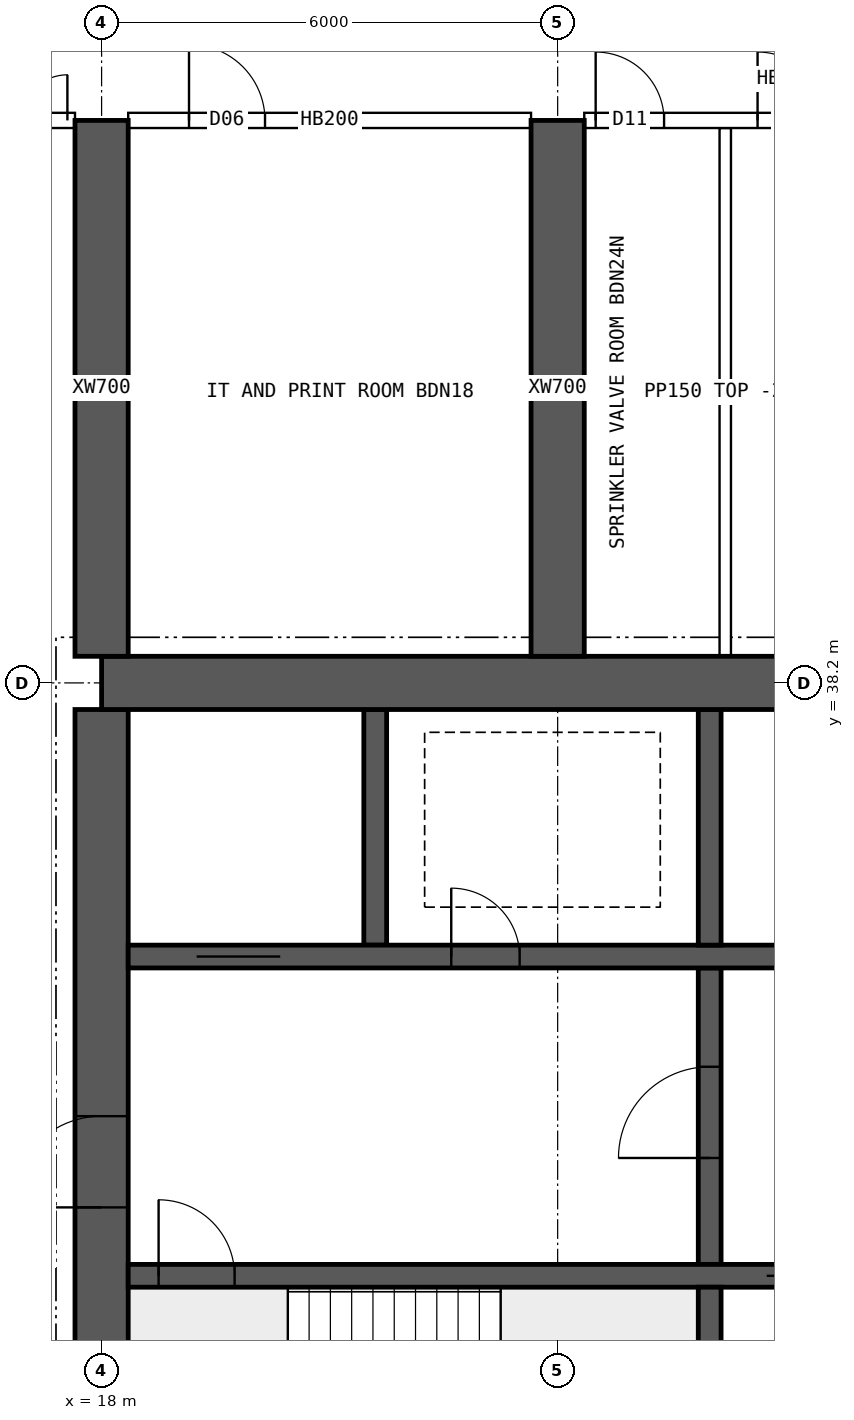
"""IFC4 building model, lengths in metres.
Left out: names, types, materials, properties, quantities, classifications, styles, units other than length and angle.
Written with IfcOpenShell. Run it as: python <this file> out.ifc"""

import sys

from ifc_helpers import new_model, si_unit, direction, frame, frame_2d, origin, place, context, subcontext, project, spatial, rectangle, extrude, element, fill, save


model = new_model("IFC4")
c1 = context("Model", 3, precision=1e-05, world=origin(), true_north=direction((0.0, 1.0)))
c2 = subcontext(c1, "Body", "Model", "MODEL_VIEW")
j1 = project(units=[si_unit("LENGTHUNIT", "METRE"), si_unit("PLANEANGLEUNIT", "RADIAN")], contexts=[c1])
p1 = place(None, origin())
s1 = spatial("IfcSite", under=j1, at=p1, CompositionType="ELEMENT")
p2 = place(p1, origin())
s2 = spatial("IfcBuilding", under=s1, at=p2, CompositionType="ELEMENT")
p3 = place(p2, frame((0.0, 0.0, 220.3)))
s3 = spatial("IfcBuildingStorey", under=s2, at=p3, CompositionType="ELEMENT", Elevation=220.3)
p4 = place(p3, frame((18.0, 38.2, 0.0), z_axis=(0.0, 0.0, 1.0), x_axis=(1.0, 0.0, 0.0)))
e1 = element("IfcWall", 1, at=p4, inside=s3, PredefinedType="SHEAR", context=c2, shape_type="SweptSolid", body=[
    extrude(rectangle(XDim=48.0, YDim=0.7, at=frame_2d((24.0, 0.0))), origin(), (0.0, 0.0, 1.0), 3.75),
])
p5 = place(p3, frame((18.0, 26.15, 0.0), z_axis=(0.0, 0.0, 1.0), x_axis=(0.0, 1.0, 0.0)))
e2 = element("IfcWall", 2, at=p5, inside=s3, PredefinedType="SHEAR", context=c2, shape_type="SweptSolid", body=[
    extrude(rectangle(XDim=11.7, YDim=0.7, at=frame_2d((5.85, 0.0))), origin(), (0.0, 0.0, 1.0), 3.75),
])
p6 = place(p5, frame((5.15, 0.0, 0.0)))
e3 = element("IfcOpeningElement", 3, at=p6, cuts=e2, PredefinedType="OPENING", context=c2, shape_type="SweptSolid", body=[
    extrude(rectangle(XDim=1.2, YDim=2.1, at=frame_2d((0.6, 1.05))), frame((0.0, 0.36, 0.0), z_axis=(0.0, -1.0, 0.0), x_axis=(1.0, 0.0, 0.0)), (0.0, 0.0, 1.0), 0.72),
])
p7 = place(p3, frame((18.35, 30.4, 0.0), z_axis=(0.0, 0.0, 1.0), x_axis=(1.0, 0.0, 0.0)))
e4 = element("IfcWall", 4, at=p7, inside=s3, PredefinedType="SHEAR", context=c2, shape_type="SweptSolid", body=[
    extrude(rectangle(XDim=47.3, YDim=0.3, at=frame_2d((23.65, 0.0))), origin(), (0.0, 0.0, 1.0), 3.75),
])
p8 = place(p7, frame((0.4, 0.0, 0.0)))
e5 = element("IfcOpeningElement", 5, at=p8, cuts=e4, PredefinedType="OPENING", context=c2, shape_type="SweptSolid", body=[
    extrude(rectangle(XDim=1.0, YDim=2.1, at=frame_2d((0.5, 1.05))), frame((0.0, 0.16, 0.0), z_axis=(0.0, -1.0, 0.0), x_axis=(1.0, 0.0, 0.0)), (0.0, 0.0, 1.0), 0.32),
])
p9 = place(p7, frame((45.9, 0.0, 0.0)))
e6 = element("IfcOpeningElement", 6, at=p9, cuts=e4, PredefinedType="OPENING", context=c2, shape_type="SweptSolid", body=[
    extrude(rectangle(XDim=1.0, YDim=2.1, at=frame_2d((0.5, 1.05))), frame((0.0, 0.16, 0.0), z_axis=(0.0, -1.0, 0.0), x_axis=(1.0, 0.0, 0.0)), (0.0, 0.0, 1.0), 0.32),
])
p10 = place(p7, frame((8.4, 0.0, 0.0)))
e7 = element("IfcOpeningElement", 7, at=p10, cuts=e4, PredefinedType="OPENING", context=c2, shape_type="SweptSolid", body=[
    extrude(rectangle(XDim=1.1, YDim=2.1, at=frame_2d((0.55, 1.05))), frame((0.0, 0.16, 0.0), z_axis=(0.0, -1.0, 0.0), x_axis=(1.0, 0.0, 0.0)), (0.0, 0.0, 1.0), 0.32),
])
p11 = place(p7, frame((11.0, 0.0, 0.0)))
e8 = element("IfcOpeningElement", 8, at=p11, cuts=e4, PredefinedType="OPENING", context=c2, shape_type="SweptSolid", body=[
    extrude(rectangle(XDim=1.1, YDim=2.1, at=frame_2d((0.55, 1.05))), frame((0.0, 0.16, 0.0), z_axis=(0.0, -1.0, 0.0), x_axis=(1.0, 0.0, 0.0)), (0.0, 0.0, 1.0), 0.32),
])
p12 = place(p7, frame((13.6, 0.0, 0.0)))
e9 = element("IfcOpeningElement", 9, at=p12, cuts=e4, PredefinedType="OPENING", context=c2, shape_type="SweptSolid", body=[
    extrude(rectangle(XDim=1.1, YDim=2.1, at=frame_2d((0.55, 1.05))), frame((0.0, 0.16, 0.0), z_axis=(0.0, -1.0, 0.0), x_axis=(1.0, 0.0, 0.0)), (0.0, 0.0, 1.0), 0.32),
])
p13 = place(p7, frame((16.2, 0.0, 0.0)))
e10 = element("IfcOpeningElement", 10, at=p13, cuts=e4, PredefinedType="OPENING", context=c2, shape_type="SweptSolid", body=[
    extrude(rectangle(XDim=1.1, YDim=2.1, at=frame_2d((0.55, 1.05))), frame((0.0, 0.16, 0.0), z_axis=(0.0, -1.0, 0.0), x_axis=(1.0, 0.0, 0.0)), (0.0, 0.0, 1.0), 0.32),
])
p14 = place(p7, frame((18.975, 0.0, 0.0)))
e11 = element("IfcOpeningElement", 11, at=p14, cuts=e4, PredefinedType="OPENING", context=c2, shape_type="SweptSolid", body=[
    extrude(rectangle(XDim=0.9, YDim=2.1, at=frame_2d((0.45, 1.05))), frame((0.0, 0.16, 0.0), z_axis=(0.0, -1.0, 0.0), x_axis=(1.0, 0.0, 0.0)), (0.0, 0.0, 1.0), 0.32),
])
p15 = place(p7, frame((24.475, 0.0, 0.0)))
e12 = element("IfcOpeningElement", 12, at=p15, cuts=e4, PredefinedType="OPENING", context=c2, shape_type="SweptSolid", body=[
    extrude(rectangle(XDim=0.9, YDim=2.1, at=frame_2d((0.45, 1.05))), frame((0.0, 0.16, 0.0), z_axis=(0.0, -1.0, 0.0), x_axis=(1.0, 0.0, 0.0)), (0.0, 0.0, 1.0), 0.32),
])
p16 = place(p7, frame((30.267, 0.0, 0.0)))
e13 = element("IfcOpeningElement", 13, at=p16, cuts=e4, PredefinedType="OPENING", context=c2, shape_type="SweptSolid", body=[
    extrude(rectangle(XDim=1.1, YDim=2.1, at=frame_2d((0.55, 1.05))), frame((0.0, 0.16, 0.0), z_axis=(0.0, -1.0, 0.0), x_axis=(1.0, 0.0, 0.0)), (0.0, 0.0, 1.0), 0.32),
])
p17 = place(p7, frame((33.8, 0.0, 0.0)))
e14 = element("IfcOpeningElement", 14, at=p17, cuts=e4, PredefinedType="OPENING", context=c2, shape_type="SweptSolid", body=[
    extrude(rectangle(XDim=1.1, YDim=2.1, at=frame_2d((0.55, 1.05))), frame((0.0, 0.16, 0.0), z_axis=(0.0, -1.0, 0.0), x_axis=(1.0, 0.0, 0.0)), (0.0, 0.0, 1.0), 0.32),
])
p18 = place(p7, frame((37.333, 0.0, 0.0)))
e15 = element("IfcOpeningElement", 15, at=p18, cuts=e4, PredefinedType="OPENING", context=c2, shape_type="SweptSolid", body=[
    extrude(rectangle(XDim=1.1, YDim=2.1, at=frame_2d((0.55, 1.05))), frame((0.0, 0.16, 0.0), z_axis=(0.0, -1.0, 0.0), x_axis=(1.0, 0.0, 0.0)), (0.0, 0.0, 1.0), 0.32),
])
p19 = place(p3, frame((18.35, 34.6, 0.0), z_axis=(0.0, 0.0, 1.0), x_axis=(1.0, 0.0, 0.0)))
e16 = element("IfcWall", 16, at=p19, inside=s3, PredefinedType="SHEAR", context=c2, shape_type="SweptSolid", body=[
    extrude(rectangle(XDim=47.3, YDim=0.3, at=frame_2d((23.65, 0.0))), origin(), (0.0, 0.0, 1.0), 3.75),
])
p20 = place(p19, frame((0.9, 0.0, 0.0)))
e17 = element("IfcOpeningElement", 17, at=p20, cuts=e16, PredefinedType="OPENING", context=c2, shape_type="SweptSolid", body=[
    extrude(rectangle(XDim=1.1, YDim=2.1, at=frame_2d((0.55, 1.05))), frame((0.0, 0.16, 0.0), z_axis=(0.0, -1.0, 0.0), x_axis=(1.0, 0.0, 0.0)), (0.0, 0.0, 1.0), 0.32),
])
p21 = place(p19, frame((45.3, 0.0, 0.0)))
e18 = element("IfcOpeningElement", 18, at=p21, cuts=e16, PredefinedType="OPENING", context=c2, shape_type="SweptSolid", body=[
    extrude(rectangle(XDim=1.1, YDim=2.1, at=frame_2d((0.55, 1.05))), frame((0.0, 0.16, 0.0), z_axis=(0.0, -1.0, 0.0), x_axis=(1.0, 0.0, 0.0)), (0.0, 0.0, 1.0), 0.32),
])
p22 = place(p19, frame((4.25, 0.0, 0.0)))
e19 = element("IfcOpeningElement", 19, at=p22, cuts=e16, PredefinedType="OPENING", context=c2, shape_type="SweptSolid", body=[
    extrude(rectangle(XDim=0.9, YDim=2.1, at=frame_2d((0.45, 1.05))), frame((0.0, 0.16, 0.0), z_axis=(0.0, -1.0, 0.0), x_axis=(1.0, 0.0, 0.0)), (0.0, 0.0, 1.0), 0.32),
])
p23 = place(p19, frame((42.15, 0.0, 0.0)))
e20 = element("IfcOpeningElement", 20, at=p23, cuts=e16, PredefinedType="OPENING", context=c2, shape_type="SweptSolid", body=[
    extrude(rectangle(XDim=0.9, YDim=2.1, at=frame_2d((0.45, 1.05))), frame((0.0, 0.16, 0.0), z_axis=(0.0, -1.0, 0.0), x_axis=(1.0, 0.0, 0.0)), (0.0, 0.0, 1.0), 0.32),
])
p24 = place(p19, frame((9.025, 0.0, 0.0)))
e21 = element("IfcOpeningElement", 21, at=p24, cuts=e16, PredefinedType="OPENING", context=c2, shape_type="SweptSolid", body=[
    extrude(rectangle(XDim=0.9, YDim=2.1, at=frame_2d((0.45, 1.05))), frame((0.0, 0.16, 0.0), z_axis=(0.0, -1.0, 0.0), x_axis=(1.0, 0.0, 0.0)), (0.0, 0.0, 1.0), 0.32),
])
p25 = place(p19, frame((12.999, 0.0, 0.0)))
e22 = element("IfcOpeningElement", 22, at=p25, cuts=e16, PredefinedType="OPENING", context=c2, shape_type="SweptSolid", body=[
    extrude(rectangle(XDim=0.9, YDim=2.1, at=frame_2d((0.45, 1.05))), frame((0.0, 0.16, 0.0), z_axis=(0.0, -1.0, 0.0), x_axis=(1.0, 0.0, 0.0)), (0.0, 0.0, 1.0), 0.32),
])
p26 = place(p19, frame((16.646, 0.0, 0.0)))
e23 = element("IfcOpeningElement", 23, at=p26, cuts=e16, PredefinedType="OPENING", context=c2, shape_type="SweptSolid", body=[
    extrude(rectangle(XDim=0.9, YDim=2.1, at=frame_2d((0.45, 1.05))), frame((0.0, 0.16, 0.0), z_axis=(0.0, -1.0, 0.0), x_axis=(1.0, 0.0, 0.0)), (0.0, 0.0, 1.0), 0.32),
])
p27 = place(p19, frame((20.405, 0.0, 0.0)))
e24 = element("IfcOpeningElement", 24, at=p27, cuts=e16, PredefinedType="OPENING", context=c2, shape_type="SweptSolid", body=[
    extrude(rectangle(XDim=0.9, YDim=2.1, at=frame_2d((0.45, 1.05))), frame((0.0, 0.16, 0.0), z_axis=(0.0, -1.0, 0.0), x_axis=(1.0, 0.0, 0.0)), (0.0, 0.0, 1.0), 0.32),
])
p28 = place(p19, frame((24.811, 0.0, 0.0)))
e25 = element("IfcOpeningElement", 25, at=p28, cuts=e16, PredefinedType="OPENING", context=c2, shape_type="SweptSolid", body=[
    extrude(rectangle(XDim=0.9, YDim=2.1, at=frame_2d((0.45, 1.05))), frame((0.0, 0.16, 0.0), z_axis=(0.0, -1.0, 0.0), x_axis=(1.0, 0.0, 0.0)), (0.0, 0.0, 1.0), 0.32),
])
p29 = place(p19, frame((27.608, 0.0, 0.0)))
e26 = element("IfcOpeningElement", 26, at=p29, cuts=e16, PredefinedType="OPENING", context=c2, shape_type="SweptSolid", body=[
    extrude(rectangle(XDim=0.9, YDim=2.1, at=frame_2d((0.45, 1.05))), frame((0.0, 0.16, 0.0), z_axis=(0.0, -1.0, 0.0), x_axis=(1.0, 0.0, 0.0)), (0.0, 0.0, 1.0), 0.32),
])
p30 = place(p19, frame((29.575, 0.0, 0.0)))
e27 = element("IfcOpeningElement", 27, at=p30, cuts=e16, PredefinedType="OPENING", context=c2, shape_type="SweptSolid", body=[
    extrude(rectangle(XDim=0.9, YDim=2.1, at=frame_2d((0.45, 1.05))), frame((0.0, 0.16, 0.0), z_axis=(0.0, -1.0, 0.0), x_axis=(1.0, 0.0, 0.0)), (0.0, 0.0, 1.0), 0.32),
])
p31 = place(p19, frame((32.007, 0.0, 0.0)))
e28 = element("IfcOpeningElement", 28, at=p31, cuts=e16, PredefinedType="OPENING", context=c2, shape_type="SweptSolid", body=[
    extrude(rectangle(XDim=0.9, YDim=2.1, at=frame_2d((0.45, 1.05))), frame((0.0, 0.16, 0.0), z_axis=(0.0, -1.0, 0.0), x_axis=(1.0, 0.0, 0.0)), (0.0, 0.0, 1.0), 0.32),
])
p32 = place(p19, frame((34.742, 0.0, 0.0)))
e29 = element("IfcOpeningElement", 29, at=p32, cuts=e16, PredefinedType="OPENING", context=c2, shape_type="SweptSolid", body=[
    extrude(rectangle(XDim=0.9, YDim=2.1, at=frame_2d((0.45, 1.05))), frame((0.0, 0.16, 0.0), z_axis=(0.0, -1.0, 0.0), x_axis=(1.0, 0.0, 0.0)), (0.0, 0.0, 1.0), 0.32),
])
p33 = place(p19, frame((37.781, 0.0, 0.0)))
e30 = element("IfcOpeningElement", 30, at=p33, cuts=e16, PredefinedType="OPENING", context=c2, shape_type="SweptSolid", body=[
    extrude(rectangle(XDim=0.9, YDim=2.1, at=frame_2d((0.45, 1.05))), frame((0.0, 0.16, 0.0), z_axis=(0.0, -1.0, 0.0), x_axis=(1.0, 0.0, 0.0)), (0.0, 0.0, 1.0), 0.32),
])
p34 = place(p3, frame((26.0, 26.15, 0.0), z_axis=(0.0, 0.0, 1.0), x_axis=(0.0, 1.0, 0.0)))
e31 = element("IfcWall", 31, at=p34, inside=s3, PredefinedType="SHEAR", context=c2, shape_type="SweptSolid", body=[
    extrude(rectangle(XDim=4.1, YDim=0.3, at=frame_2d((2.05, 0.0))), origin(), (0.0, 0.0, 1.0), 3.75),
])
p35 = place(p3, frame((26.0, 30.55, 0.0), z_axis=(0.0, 0.0, 1.0), x_axis=(0.0, 1.0, 0.0)))
e32 = element("IfcWall", 32, at=p35, inside=s3, PredefinedType="SHEAR", context=c2, shape_type="SweptSolid", body=[
    extrude(rectangle(XDim=3.9, YDim=0.3, at=frame_2d((1.95, 0.0))), origin(), (0.0, 0.0, 1.0), 3.75),
])
p36 = place(p35, frame((1.4, 0.0, 0.0)))
e33 = element("IfcOpeningElement", 33, at=p36, cuts=e32, PredefinedType="OPENING", context=c2, shape_type="SweptSolid", body=[
    extrude(rectangle(XDim=1.2, YDim=2.1, at=frame_2d((0.6, 1.05))), frame((0.0, 0.16, 0.0), z_axis=(0.0, -1.0, 0.0), x_axis=(1.0, 0.0, 0.0)), (0.0, 0.0, 1.0), 0.32),
])
for number, where, z_axis, x_axis in (
    (34, (21.6, 34.75, 0.0), (0.0, 0.0, 1.0), (0.0, 1.0, 0.0)),
    (35, (26.0, 34.75, 0.0), (0.0, 0.0, 1.0), (0.0, 1.0, 0.0)),
):
    element("IfcWall", number, at=place(p3, frame(where, z_axis=z_axis, x_axis=x_axis)), inside=s3, PredefinedType="SHEAR", context=c2, shape_type="SweptSolid", body=[
        extrude(rectangle(XDim=3.1, YDim=0.3, at=frame_2d((1.55, 0.0))), origin(), (0.0, 0.0, 1.0), 3.75),
    ])
for number, where, z_axis, x_axis in (
    (36, (18.0, 38.55, 0.0), (0.0, 0.0, 1.0), (0.0, 1.0, 0.0)),
    (37, (24.0, 38.55, 0.0), (0.0, 0.0, 1.0), (0.0, 1.0, 0.0)),
):
    element("IfcWall", number, at=place(p3, frame(where, z_axis=z_axis, x_axis=x_axis)), inside=s3, PredefinedType="SHEAR", context=c2, shape_type="SweptSolid", body=[
        extrude(rectangle(XDim=7.05, YDim=0.7, at=frame_2d((3.525, 0.0))), origin(), (0.0, 0.0, 1.0), 3.75),
    ])
p37 = place(p3, frame((15.6, 45.6, 0.0), z_axis=(0.0, 0.0, 1.0), x_axis=(1.0, 0.0, 0.0)))
e38 = element("IfcWall", 38, at=p37, inside=s3, PredefinedType="SOLIDWALL", context=c2, shape_type="SweptSolid", body=[
    extrude(rectangle(XDim=2.05, YDim=0.2, at=frame_2d((1.025, 0.0))), origin(), (0.0, 0.0, 1.0), 3.5),
])
p38 = place(p37, frame((0.75, 0.0, 0.0)))
e39 = element("IfcOpeningElement", 39, at=p38, cuts=e38, PredefinedType="OPENING", context=c2, shape_type="SweptSolid", body=[
    extrude(rectangle(XDim=1.2, YDim=2.1, at=frame_2d((0.6, 1.05))), frame((0.0, 0.11, 0.0), z_axis=(0.0, -1.0, 0.0), x_axis=(1.0, 0.0, 0.0)), (0.0, 0.0, 1.0), 0.22),
])
p39 = place(p3, frame((18.35, 45.6, 0.0), z_axis=(0.0, 0.0, 1.0), x_axis=(1.0, 0.0, 0.0)))
e40 = element("IfcWall", 40, at=p39, inside=s3, PredefinedType="SOLIDWALL", context=c2, shape_type="SweptSolid", body=[
    extrude(rectangle(XDim=5.3, YDim=0.2, at=frame_2d((2.65, 0.0))), origin(), (0.0, 0.0, 1.0), 3.5),
])
p40 = place(p39, frame((0.8, 0.0, 0.0)))
e41 = element("IfcOpeningElement", 41, at=p40, cuts=e40, PredefinedType="OPENING", context=c2, shape_type="SweptSolid", body=[
    extrude(rectangle(XDim=1.0, YDim=2.1, at=frame_2d((0.5, 1.05))), frame((0.0, 0.11, 0.0), z_axis=(0.0, -1.0, 0.0), x_axis=(1.0, 0.0, 0.0)), (0.0, 0.0, 1.0), 0.22),
])
p41 = place(p3, frame((24.35, 45.6, 0.0), z_axis=(0.0, 0.0, 1.0), x_axis=(1.0, 0.0, 0.0)))
e42 = element("IfcWall", 42, at=p41, inside=s3, PredefinedType="SOLIDWALL", context=c2, shape_type="SweptSolid", body=[
    extrude(rectangle(XDim=5.3, YDim=0.2, at=frame_2d((2.65, 0.0))), origin(), (0.0, 0.0, 1.0), 3.5),
])
p42 = place(p41, frame((0.15, 0.0, 0.0)))
e43 = element("IfcOpeningElement", 43, at=p42, cuts=e42, PredefinedType="OPENING", context=c2, shape_type="SweptSolid", body=[
    extrude(rectangle(XDim=0.9, YDim=2.1, at=frame_2d((0.45, 1.05))), frame((0.0, 0.11, 0.0), z_axis=(0.0, -1.0, 0.0), x_axis=(1.0, 0.0, 0.0)), (0.0, 0.0, 1.0), 0.22),
])
p43 = place(p41, frame((2.28, 0.0, 0.0)))
e44 = element("IfcOpeningElement", 44, at=p43, cuts=e42, PredefinedType="OPENING", context=c2, shape_type="SweptSolid", body=[
    extrude(rectangle(XDim=0.9, YDim=2.1, at=frame_2d((0.45, 1.05))), frame((0.0, 0.11, 0.0), z_axis=(0.0, -1.0, 0.0), x_axis=(1.0, 0.0, 0.0)), (0.0, 0.0, 1.0), 0.22),
])
p44 = place(p3, frame((26.205, 38.55, 0.0), z_axis=(0.0, 0.0, 1.0), x_axis=(0.0, 1.0, 0.0)))
e45 = element("IfcWall", 45, at=p44, inside=s3, PredefinedType="PARTITIONING", context=c2, shape_type="SweptSolid", body=[
    extrude(rectangle(XDim=6.95, YDim=0.15, at=frame_2d((3.475, 0.0))), origin(), (0.0, 0.0, 1.0), 3.5),
])
p45 = place(p6, origin())
e46 = element("IfcDoor", 46, at=p45, inside=s3, OperationType="SINGLE_SWING_LEFT", PredefinedType="DOOR", context=c2, shape_type="SweptSolid", body=[
    extrude(rectangle(XDim=1.2, YDim=2.1, at=frame_2d((0.6, 1.05))), frame((0.0, 0.025, 0.0), z_axis=(0.0, -1.0, 0.0), x_axis=(1.0, 0.0, 0.0)), (0.0, 0.0, 1.0), 0.05),
])
fill(e3, e46)
p46 = place(p8, origin())
e47 = element("IfcDoor", 47, at=p46, inside=s3, OperationType="SINGLE_SWING_LEFT", PredefinedType="DOOR", context=c2, shape_type="SweptSolid", body=[
    extrude(rectangle(XDim=1.0, YDim=2.1, at=frame_2d((0.5, 1.05))), frame((0.0, 0.025, 0.0), z_axis=(0.0, -1.0, 0.0), x_axis=(1.0, 0.0, 0.0)), (0.0, 0.0, 1.0), 0.05),
])
fill(e5, e47)
p47 = place(p20, origin())
e48 = element("IfcDoor", 48, at=p47, inside=s3, OperationType="DOUBLE_DOOR_SLIDING", PredefinedType="DOOR", context=c2, shape_type="SweptSolid", body=[
    extrude(rectangle(XDim=1.1, YDim=2.1, at=frame_2d((0.55, 1.05))), frame((0.0, 0.025, 0.0), z_axis=(0.0, -1.0, 0.0), x_axis=(1.0, 0.0, 0.0)), (0.0, 0.0, 1.0), 0.05),
])
fill(e17, e48)
p48 = place(p22, origin())
e49 = element("IfcDoor", 49, at=p48, inside=s3, OperationType="SINGLE_SWING_LEFT", PredefinedType="DOOR", context=c2, shape_type="SweptSolid", body=[
    extrude(rectangle(XDim=0.9, YDim=2.1, at=frame_2d((0.45, 1.05))), frame((0.0, 0.025, 0.0), z_axis=(0.0, -1.0, 0.0), x_axis=(1.0, 0.0, 0.0)), (0.0, 0.0, 1.0), 0.05),
])
fill(e19, e49)
p49 = place(p36, origin())
e50 = element("IfcDoor", 50, at=p49, inside=s3, OperationType="SINGLE_SWING_LEFT", PredefinedType="DOOR", context=c2, shape_type="SweptSolid", body=[
    extrude(rectangle(XDim=1.2, YDim=2.1, at=frame_2d((0.6, 1.05))), frame((0.0, 0.025, 0.0), z_axis=(0.0, -1.0, 0.0), x_axis=(1.0, 0.0, 0.0)), (0.0, 0.0, 1.0), 0.05),
])
fill(e33, e50)
p50 = place(p10, origin())
e51 = element("IfcDoor", 51, at=p50, inside=s3, OperationType="DOUBLE_DOOR_SLIDING", PredefinedType="DOOR", context=c2, shape_type="SweptSolid", body=[
    extrude(rectangle(XDim=1.1, YDim=2.1, at=frame_2d((0.55, 1.05))), frame((0.0, 0.025, 0.0), z_axis=(0.0, -1.0, 0.0), x_axis=(1.0, 0.0, 0.0)), (0.0, 0.0, 1.0), 0.05),
])
fill(e7, e51)
p51 = place(p38, origin())
e52 = element("IfcDoor", 52, at=p51, inside=s3, OperationType="DOUBLE_DOOR_SINGLE_SWING", PredefinedType="DOOR", context=c2, shape_type="SweptSolid", body=[
    extrude(rectangle(XDim=1.2, YDim=2.1, at=frame_2d((0.6, 1.05))), frame((0.0, 0.025, 0.0), z_axis=(0.0, -1.0, 0.0), x_axis=(1.0, 0.0, 0.0)), (0.0, 0.0, 1.0), 0.05),
])
fill(e39, e52)
p52 = place(p40, origin())
e53 = element("IfcDoor", 53, at=p52, inside=s3, OperationType="SINGLE_SWING_LEFT", PredefinedType="DOOR", context=c2, shape_type="SweptSolid", body=[
    extrude(rectangle(XDim=1.0, YDim=2.1, at=frame_2d((0.5, 1.05))), frame((0.0, 0.025, 0.0), z_axis=(0.0, -1.0, 0.0), x_axis=(1.0, 0.0, 0.0)), (0.0, 0.0, 1.0), 0.05),
])
fill(e41, e53)
p53 = place(p42, origin())
e54 = element("IfcDoor", 54, at=p53, inside=s3, OperationType="SINGLE_SWING_LEFT", PredefinedType="DOOR", context=c2, shape_type="SweptSolid", body=[
    extrude(rectangle(XDim=0.9, YDim=2.1, at=frame_2d((0.45, 1.05))), frame((0.0, 0.025, 0.0), z_axis=(0.0, -1.0, 0.0), x_axis=(1.0, 0.0, 0.0)), (0.0, 0.0, 1.0), 0.05),
])
fill(e43, e54)
p54 = place(p43, origin())
e55 = element("IfcDoor", 55, at=p54, inside=s3, OperationType="SINGLE_SWING_LEFT", PredefinedType="DOOR", context=c2, shape_type="SweptSolid", body=[
    extrude(rectangle(XDim=0.9, YDim=2.1, at=frame_2d((0.45, 1.05))), frame((0.0, 0.025, 0.0), z_axis=(0.0, -1.0, 0.0), x_axis=(1.0, 0.0, 0.0)), (0.0, 0.0, 1.0), 0.05),
])
fill(e44, e55)
save(model, sys.argv[1])
